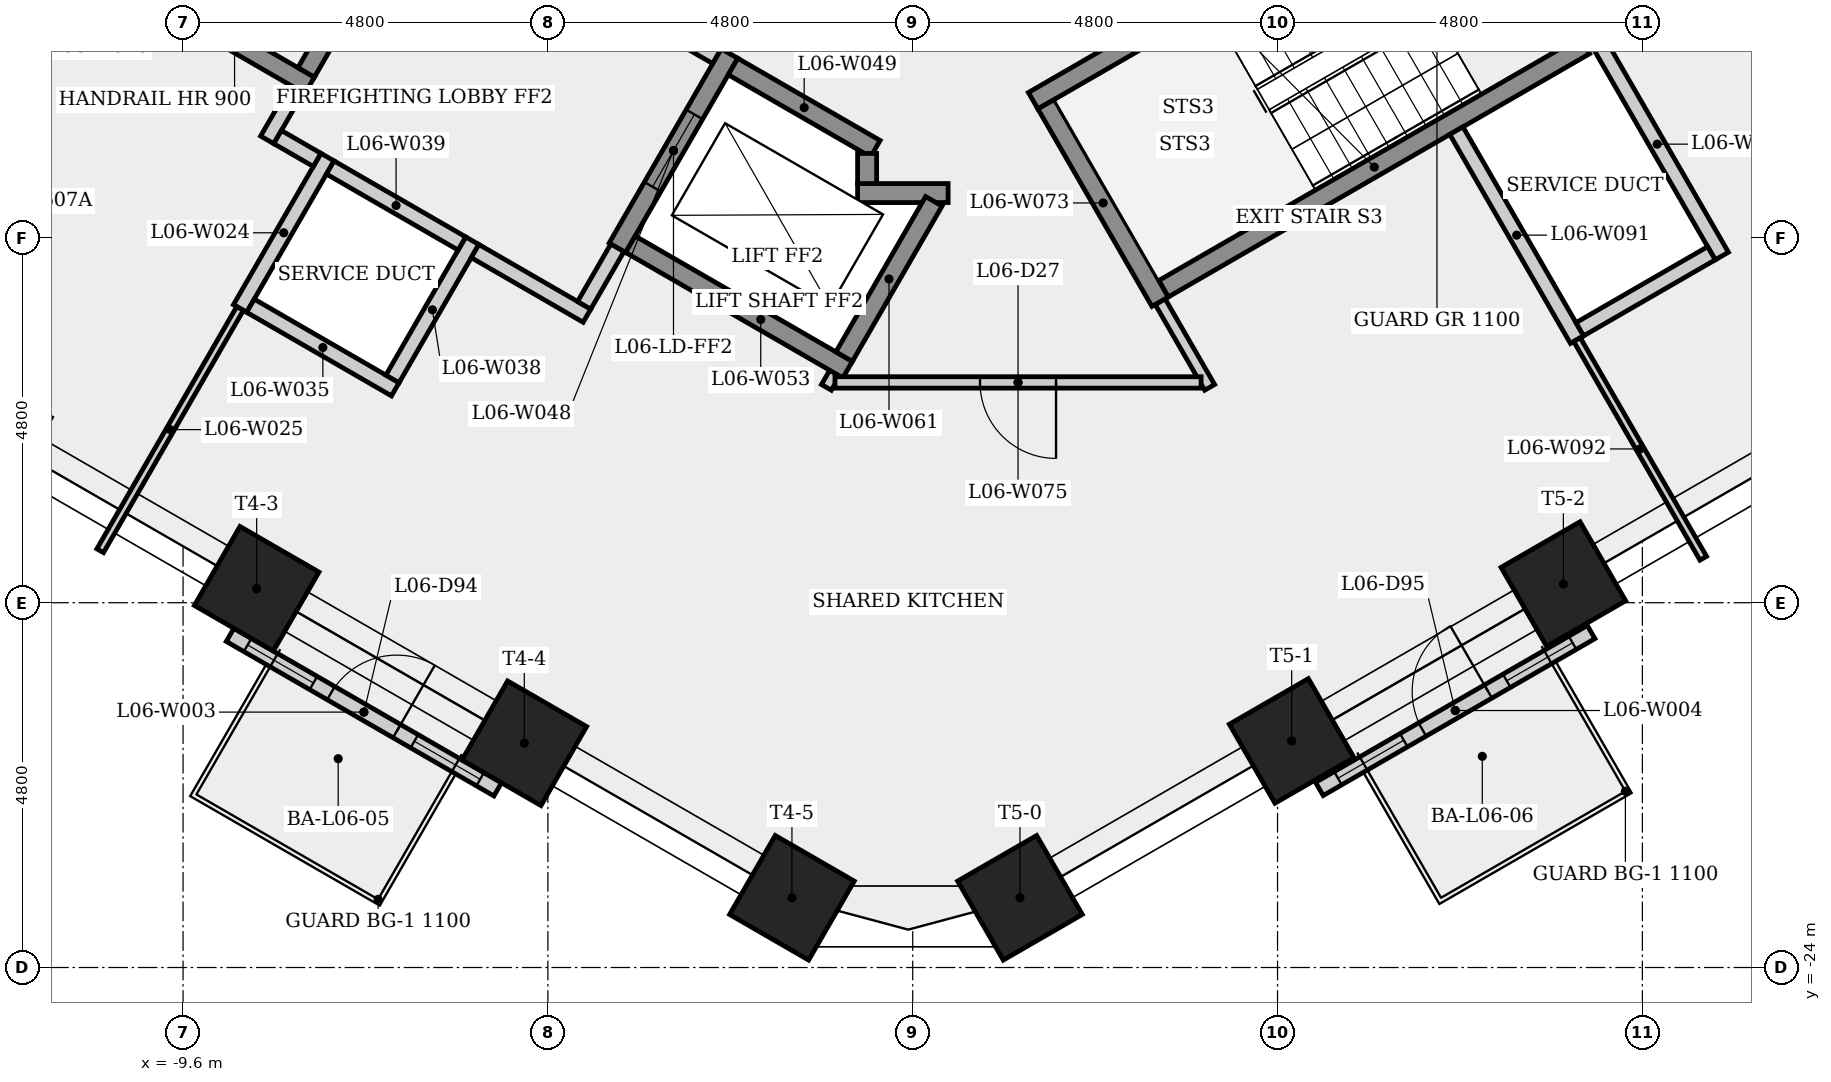
"""IFC4 building model, lengths in metres.
Left out: names, types, materials, properties, quantities, classifications, styles, units other than length and angle.
Written with IfcOpenShell. Run it as: python <this file> out.ifc"""

import sys

from ifc_helpers import new_model, si_unit, direction, frame, frame_2d, origin, origin_2d, place, context, subcontext, project, spatial, rectangle, extrude, element, fill, save


model = new_model("IFC4")
c1 = context("Model", 3, precision=1e-05, world=origin(), true_north=direction((0.0, 1.0)))
c2 = subcontext(c1, "Body", "Model", "MODEL_VIEW")
j1 = project(units=[si_unit("LENGTHUNIT", "METRE"), si_unit("PLANEANGLEUNIT", "RADIAN")], contexts=[c1])
p1 = place(None, origin())
s1 = spatial("IfcSite", under=j1, at=p1, CompositionType="ELEMENT")
p2 = place(p1, origin())
s2 = spatial("IfcBuilding", under=s1, at=p2, CompositionType="ELEMENT")
p3 = place(p2, frame((0.0, 0.0, 28.9)))
s3 = spatial("IfcBuildingStorey", under=s2, at=p3, CompositionType="ELEMENT", Elevation=28.9)
for number, where, z_axis, x_axis in (
    (1, (-8.632, -19.017, 0.0), (0.0, 0.0, 1.0), (-0.5, -0.866, 0.0)),
    (2, (-5.11, -21.05, 0.0), (0.0, 0.0, 1.0), (-0.5, -0.866, 0.0)),
    (3, (-1.589, -23.083, 0.0), (0.0, 0.0, 1.0), (-0.5, -0.866, 0.0)),
    (4, (1.411, -23.083, 0.0), (0.0, 0.0, 1.0), (0.5, -0.866, 0.0)),
    (5, (4.986, -21.019, 0.0), (0.0, 0.0, 1.0), (0.5, -0.866, 0.0)),
    (6, (8.561, -18.955, 0.0), (0.0, 0.0, 1.0), (0.5, -0.866, 0.0)),
):
    element("IfcColumn", number, at=place(p3, frame(where, z_axis=z_axis, x_axis=x_axis)), inside=s3, PredefinedType="COLUMN", context=c2, shape_type="SweptSolid", body=[
        extrude(rectangle(XDim=1.2, YDim=1.2, at=origin_2d()), origin(), (0.0, 0.0, 1.0), 3.4),
    ])
p4 = place(p3, frame((-8.981, -19.623, 0.0), z_axis=(0.0, 0.0, 1.0), x_axis=(0.866028600041, -0.49999446388, 0.0)))
e7 = element("IfcWall", 7, at=p4, inside=s3, PredefinedType="SOLIDWALL", context=c2, shape_type="SweptSolid", body=[
    extrude(rectangle(XDim=4.066, YDim=0.2, at=frame_2d((2.033, 0.0))), origin(), (0.0, 0.0, 1.0), 3.4),
])
p5 = place(p4, frame((1.533, 0.0, 0.0)))
e8 = element("IfcOpeningElement", 8, at=p5, cuts=e7, PredefinedType="OPENING", context=c2, shape_type="SweptSolid", body=[
    extrude(rectangle(XDim=1.0, YDim=2.4, at=frame_2d((0.5, 1.2))), frame((0.0, 0.11, 0.0), z_axis=(0.0, -1.0, 0.0), x_axis=(1.0, 0.0, 0.0)), (0.0, 0.0, 1.0), 0.22),
])
p6 = place(p4, frame((0.267, 0.0, 0.9)))
e9 = element("IfcOpeningElement", 9, at=p6, cuts=e7, PredefinedType="OPENING", context=c2, shape_type="SweptSolid", body=[
    extrude(rectangle(XDim=1.0, YDim=1.5, at=frame_2d((0.5, 0.75))), frame((0.0, 0.11, 0.0), z_axis=(0.0, -1.0, 0.0), x_axis=(1.0, 0.0, 0.0)), (0.0, 0.0, 1.0), 0.22),
])
p7 = place(p4, frame((2.8, 0.0, 0.9)))
e10 = element("IfcOpeningElement", 10, at=p7, cuts=e7, PredefinedType="OPENING", context=c2, shape_type="SweptSolid", body=[
    extrude(rectangle(XDim=1.0, YDim=1.5, at=frame_2d((0.5, 0.75))), frame((0.0, 0.11, 0.0), z_axis=(0.0, -1.0, 0.0), x_axis=(1.0, 0.0, 0.0)), (0.0, 0.0, 1.0), 0.22),
])
p8 = place(p3, frame((5.351, -21.65, 0.0), z_axis=(0.0, 0.0, 1.0), x_axis=(0.866028988896, 0.499993790352, 0.0)))
e11 = element("IfcWall", 11, at=p8, inside=s3, PredefinedType="SOLIDWALL", context=c2, shape_type="SweptSolid", body=[
    extrude(rectangle(XDim=4.128, YDim=0.2, at=frame_2d((2.064, 0.0))), origin(), (0.0, 0.0, 1.0), 3.4),
])
p9 = place(p8, frame((1.564, 0.0, 0.0)))
e12 = element("IfcOpeningElement", 12, at=p9, cuts=e11, PredefinedType="OPENING", context=c2, shape_type="SweptSolid", body=[
    extrude(rectangle(XDim=1.0, YDim=2.4, at=frame_2d((0.5, 1.2))), frame((0.0, 0.11, 0.0), z_axis=(0.0, -1.0, 0.0), x_axis=(1.0, 0.0, 0.0)), (0.0, 0.0, 1.0), 0.22),
])
p10 = place(p8, frame((0.282, 0.0, 0.9)))
e13 = element("IfcOpeningElement", 13, at=p10, cuts=e11, PredefinedType="OPENING", context=c2, shape_type="SweptSolid", body=[
    extrude(rectangle(XDim=1.0, YDim=1.5, at=frame_2d((0.5, 0.75))), frame((0.0, 0.11, 0.0), z_axis=(0.0, -1.0, 0.0), x_axis=(1.0, 0.0, 0.0)), (0.0, 0.0, 1.0), 0.22),
])
p11 = place(p8, frame((2.846, 0.0, 0.9)))
e14 = element("IfcOpeningElement", 14, at=p11, cuts=e11, PredefinedType="OPENING", context=c2, shape_type="SweptSolid", body=[
    extrude(rectangle(XDim=1.0, YDim=1.5, at=frame_2d((0.5, 0.75))), frame((0.0, 0.11, 0.0), z_axis=(0.0, -1.0, 0.0), x_axis=(1.0, 0.0, 0.0)), (0.0, 0.0, 1.0), 0.22),
])
p12 = place(p3, frame((-8.85, -15.329, 0.0), z_axis=(0.0, 0.0, 1.0), x_axis=(0.500077740698, 0.865980515519, 0.0)))
e15 = element("IfcWall", 15, at=p12, inside=s3, PredefinedType="PLUMBINGWALL", context=c2, shape_type="SweptSolid", body=[
    extrude(rectangle(XDim=2.3, YDim=0.2, at=frame_2d((1.15, 0.0))), origin(), (0.0, 0.0, 1.0), 3.05),
])
p13 = place(p3, frame((-8.85, -15.329, 0.0), z_axis=(0.0, 0.0, 1.0), x_axis=(-0.499955964762, -0.866050826049, 0.0)))
e16 = element("IfcWall", 16, at=p13, inside=s3, PredefinedType="PARTITIONING", context=c2, shape_type="SweptSolid", body=[
    extrude(rectangle(XDim=3.68, YDim=0.1, at=frame_2d((1.84, 0.0))), origin(), (0.0, 0.0, 1.0), 3.05),
])
p14 = place(p3, frame((-8.493, -13.11, 0.0), z_axis=(0.0, 0.0, 1.0), x_axis=(0.500067724834, 0.865986299303, 0.0)))
e17 = element("IfcWall", 17, at=p14, inside=s3, PredefinedType="PARTITIONING", context=c2, shape_type="SweptSolid", body=[
    extrude(rectangle(XDim=0.775, YDim=0.2, at=frame_2d((0.388, 0.0))), origin(), (0.0, 0.0, 1.0), 3.05),
])
p15 = place(p3, frame((-7.935, -12.393, 0.0), z_axis=(0.0, 0.0, 1.0), x_axis=(-0.866025499775, 0.499999833739, 0.0)))
e18 = element("IfcWall", 18, at=p15, inside=s3, PredefinedType="SHEAR", context=c2, shape_type="SweptSolid", body=[
    extrude(rectangle(XDim=6.4, YDim=0.25, at=frame_2d((3.2, 0.0))), origin(), (0.0, 0.0, 1.0), 3.05),
])
p16 = place(p3, frame((-7.836, -13.373, 0.0), z_axis=(0.0, 0.0, 1.0), x_axis=(-0.866232998003, 0.499640263761, 0.0)))
e19 = element("IfcWall", 19, at=p16, inside=s3, PredefinedType="PARTITIONING", context=c2, shape_type="SweptSolid", body=[
    extrude(rectangle(XDim=0.6, YDim=0.2, at=frame_2d((0.3, 0.0))), origin(), (0.0, 0.0, 1.0), 3.05),
])
p17 = place(p3, frame((-6.808, -16.392, 0.0), z_axis=(0.0, 0.0, 1.0), x_axis=(-0.866008176907, 0.50002983664, 0.0)))
e20 = element("IfcWall", 20, at=p17, inside=s3, PredefinedType="PLUMBINGWALL", context=c2, shape_type="SweptSolid", body=[
    extrude(rectangle(XDim=2.2, YDim=0.2, at=frame_2d((1.1, 0.0))), origin(), (0.0, 0.0, 1.0), 3.05),
])
p18 = place(p3, frame((-6.605, -9.841, 0.0), z_axis=(0.0, 0.0, 1.0), x_axis=(-0.499996545922, -0.866027397988, 0.0)))
e21 = element("IfcWall", 21, at=p18, inside=s3, PredefinedType="SHEAR", context=c2, shape_type="SweptSolid", body=[
    extrude(rectangle(XDim=2.75, YDim=0.25, at=frame_2d((1.375, 0.0))), origin(), (0.0, 0.0, 1.0), 3.05),
])
p19 = place(p18, frame((0.875, 0.0, 0.0)))
e22 = element("IfcOpeningElement", 22, at=p19, cuts=e21, PredefinedType="OPENING", context=c2, shape_type="SweptSolid", body=[
    extrude(rectangle(XDim=1.0, YDim=2.1, at=frame_2d((0.5, 1.05))), frame((0.0, 0.135, 0.0), z_axis=(0.0, -1.0, 0.0), x_axis=(1.0, 0.0, 0.0)), (0.0, 0.0, 1.0), 0.27),
])
p20 = place(p3, frame((-6.435, -9.795, 0.0), z_axis=(0.0, 0.0, 1.0), x_axis=(0.866012907634, -0.500021643343, 0.0)))
e23 = element("IfcWall", 23, at=p20, inside=s3, PredefinedType="PARTITIONING", context=c2, shape_type="SweptSolid", body=[
    extrude(rectangle(XDim=4.45, YDim=0.2, at=frame_2d((2.225, 0.0))), origin(), (0.0, 0.0, 1.0), 3.05),
])
p21 = place(p20, frame((1.675, 0.0, 0.0)))
e24 = element("IfcOpeningElement", 24, at=p21, cuts=e23, PredefinedType="OPENING", context=c2, shape_type="SweptSolid", body=[
    extrude(rectangle(XDim=1.1, YDim=2.1, at=frame_2d((0.55, 1.05))), frame((0.0, 0.11, 0.0), z_axis=(0.0, -1.0, 0.0), x_axis=(1.0, 0.0, 0.0)), (0.0, 0.0, 1.0), 0.22),
])
p22 = place(p3, frame((-5.795, -14.437, 0.0), z_axis=(0.0, 0.0, 1.0), x_axis=(-0.500027713859, -0.866009402589, 0.0)))
e25 = element("IfcWall", 25, at=p22, inside=s3, PredefinedType="PLUMBINGWALL", context=c2, shape_type="SweptSolid", body=[
    extrude(rectangle(XDim=2.1, YDim=0.2, at=frame_2d((1.05, 0.0))), origin(), (0.0, 0.0, 1.0), 3.05),
])
p23 = place(p3, frame((-5.931, -14.473, 0.0), z_axis=(0.0, 0.0, 1.0), x_axis=(-0.866041268327, 0.499972520799, 0.0)))
e26 = element("IfcWall", 26, at=p23, inside=s3, PredefinedType="PLUMBINGWALL", context=c2, shape_type="SweptSolid", body=[
    extrude(rectangle(XDim=2.0, YDim=0.2, at=frame_2d((1.0, 0.0))), origin(), (0.0, 0.0, 1.0), 3.05),
])
p24 = place(p3, frame((-4.286, -15.423, 0.0), z_axis=(0.0, 0.0, 1.0), x_axis=(-0.866025371046, 0.500000056704, 0.0)))
e27 = element("IfcWall", 27, at=p24, inside=s3, PredefinedType="PARTITIONING", context=c2, shape_type="SweptSolid", body=[
    extrude(rectangle(XDim=1.7, YDim=0.2, at=frame_2d((0.85, 0.0))), origin(), (0.0, 0.0, 1.0), 3.05),
])
p25 = place(p3, frame((-3.885, -14.529, 0.0), z_axis=(0.0, 0.0, 1.0), x_axis=(-0.499859285417, -0.866106630146, 0.0)))
e28 = element("IfcWall", 28, at=p25, inside=s3, PredefinedType="PARTITIONING", context=c2, shape_type="SweptSolid", body=[
    extrude(rectangle(XDim=0.875, YDim=0.2, at=frame_2d((0.438, 0.0))), origin(), (0.0, 0.0, 1.0), 3.05),
])
p26 = place(p3, frame((-2.41, -11.974, 0.0), z_axis=(0.0, 0.0, 1.0), x_axis=(-0.500001826776, -0.866024349092, 0.0)))
e29 = element("IfcWall", 29, at=p26, inside=s3, PredefinedType="SHEAR", context=c2, shape_type="SweptSolid", body=[
    extrude(rectangle(XDim=2.95, YDim=0.25, at=frame_2d((1.475, 0.0))), origin(), (0.0, 0.0, 1.0), 3.05),
])
p27 = place(p26, frame((0.925, 0.0, 0.0)))
e30 = element("IfcOpeningElement", 30, at=p27, cuts=e29, PredefinedType="OPENING", context=c2, shape_type="SweptSolid", body=[
    extrude(rectangle(XDim=1.1, YDim=2.1, at=frame_2d((0.55, 1.05))), frame((0.0, 0.135, 0.0), z_axis=(0.0, -1.0, 0.0), x_axis=(1.0, 0.0, 0.0)), (0.0, 0.0, 1.0), 0.27),
])
p28 = place(p3, frame((-2.364, -12.145, 0.0), z_axis=(0.0, 0.0, 1.0), x_axis=(0.86603892542, -0.499976579108, 0.0)))
e31 = element("IfcWall", 31, at=p28, inside=s3, PredefinedType="SHEAR", context=c2, shape_type="SweptSolid", body=[
    extrude(rectangle(XDim=2.162, YDim=0.25, at=frame_2d((1.081, 0.0))), origin(), (0.0, 0.0, 1.0), 3.05),
])
p29 = place(p3, frame((-1.135, -16.367, 0.0), z_axis=(0.0, 0.0, 1.0), x_axis=(0.500014901547, 0.866016800201, 0.0)))
e32 = element("IfcWall", 32, at=p29, inside=s3, PredefinedType="PARTITIONING", context=c2, shape_type="SweptSolid", body=[
    extrude(rectangle(XDim=0.217, YDim=0.15, at=frame_2d((0.108, 0.0))), origin(), (0.0, 0.0, 1.0), 3.05),
])
p30 = place(p3, frame((-0.856, -16.133, 0.0), z_axis=(0.0, 0.0, 1.0), x_axis=(-0.866021716278, 0.500006386895, 0.0)))
e33 = element("IfcWall", 33, at=p30, inside=s3, PredefinedType="SHEAR", context=c2, shape_type="SweptSolid", body=[
    extrude(rectangle(XDim=3.3, YDim=0.25, at=frame_2d((1.65, 0.0))), origin(), (0.0, 0.0, 1.0), 3.05),
])
p31 = place(p3, frame((-0.725, -13.81, 0.0), z_axis=(0.0, 0.0, 1.0), x_axis=(1.0, 0.0, 0.0)))
e34 = element("IfcWall", 34, at=p31, inside=s3, PredefinedType="SHEAR", context=c2, shape_type="SweptSolid", body=[
    extrude(rectangle(XDim=1.191, YDim=0.25, at=frame_2d((0.595, 0.0))), origin(), (0.0, 0.0, 1.0), 3.05),
])
p32 = place(p3, frame((-0.6, -13.289, 0.0), z_axis=(0.0, 0.0, 1.0), x_axis=(0.0, -1.0, 0.0)))
e35 = element("IfcWall", 35, at=p32, inside=s3, PredefinedType="SHEAR", context=c2, shape_type="SweptSolid", body=[
    extrude(rectangle(XDim=0.396, YDim=0.25, at=frame_2d((0.198, 0.0))), origin(), (0.0, 0.0, 1.0), 3.4),
])
p33 = place(p3, frame((0.278, -13.918, 0.0), z_axis=(0.0, 0.0, 1.0), x_axis=(-0.49998806882, -0.866032292145, 0.0)))
e36 = element("IfcWall", 36, at=p33, inside=s3, PredefinedType="SHEAR", context=c2, shape_type="SweptSolid", body=[
    extrude(rectangle(XDim=2.36, YDim=0.25, at=frame_2d((1.18, 0.0))), origin(), (0.0, 0.0, 1.0), 3.4),
])
p34 = place(p3, frame((1.585, -12.595, 0.0), z_axis=(0.0, 0.0, 1.0), x_axis=(0.866036417653, 0.499980922934, 0.0)))
e37 = element("IfcWall", 37, at=p34, inside=s3, PredefinedType="SHEAR", context=c2, shape_type="SweptSolid", body=[
    extrude(rectangle(XDim=6.65, YDim=0.25, at=frame_2d((3.325, 0.0))), origin(), (0.0, 0.0, 1.0), 3.05),
])
p35 = place(p34, frame((5.275, 0.0, 0.0)))
e38 = element("IfcOpeningElement", 38, at=p35, cuts=e37, PredefinedType="OPENING", context=c2, shape_type="SweptSolid", body=[
    extrude(rectangle(XDim=1.0, YDim=2.1, at=frame_2d((0.5, 1.05))), frame((0.0, 0.135, 0.0), z_axis=(0.0, -1.0, 0.0), x_axis=(1.0, 0.0, 0.0)), (0.0, 0.0, 1.0), 0.27),
])
p36 = place(p3, frame((3.256, -15.239, 0.0), z_axis=(0.0, 0.0, 1.0), x_axis=(0.499949632511, -0.866054481515, 0.0)))
e39 = element("IfcWall", 39, at=p36, inside=s3, PredefinedType="PARTITIONING", context=c2, shape_type="SweptSolid", body=[
    extrude(rectangle(XDim=1.302, YDim=0.15, at=frame_2d((0.651, 0.0))), origin(), (0.0, 0.0, 1.0), 3.05),
])
p37 = place(p3, frame((3.256, -15.239, 0.0), z_axis=(0.0, 0.0, 1.0), x_axis=(-0.50002537861, 0.866010750942, 0.0)))
e40 = element("IfcWall", 40, at=p37, inside=s3, PredefinedType="SHEAR", context=c2, shape_type="SweptSolid", body=[
    extrude(rectangle(XDim=3.0, YDim=0.25, at=frame_2d((1.5, 0.0))), origin(), (0.0, 0.0, 1.0), 3.05),
])
p38 = place(p3, frame((3.794, -16.302, 0.0), z_axis=(0.0, 0.0, 1.0), x_axis=(-1.0, 0.0, 0.0)))
e41 = element("IfcWall", 41, at=p38, inside=s3, PredefinedType="PARTITIONING", context=c2, shape_type="SweptSolid", body=[
    extrude(rectangle(XDim=4.817, YDim=0.15, at=frame_2d((2.409, 0.0))), origin(), (0.0, 0.0, 1.0), 3.05),
])
p39 = place(p38, frame((1.908, 0.0, 0.0)))
e42 = element("IfcOpeningElement", 42, at=p39, cuts=e41, PredefinedType="OPENING", context=c2, shape_type="SweptSolid", body=[
    extrude(rectangle(XDim=1.0, YDim=2.1, at=frame_2d((0.5, 1.05))), frame((0.0, 0.085, 0.0), z_axis=(0.0, -1.0, 0.0), x_axis=(1.0, 0.0, 0.0)), (0.0, 0.0, 1.0), 0.17),
])
p40 = place(p3, frame((3.301, -15.068, 0.0), z_axis=(0.0, 0.0, 1.0), x_axis=(0.866035036182, 0.499983315828, 0.0)))
e43 = element("IfcWall", 43, at=p40, inside=s3, PredefinedType="SHEAR", context=c2, shape_type="SweptSolid", body=[
    extrude(rectangle(XDim=6.4, YDim=0.25, at=frame_2d((3.2, 0.0))), origin(), (0.0, 0.0, 1.0), 3.05),
])
p41 = place(p3, frame((7.153, -12.989, 0.0), z_axis=(0.0, 0.0, 1.0), x_axis=(0.500017526161, -0.866015284814, 0.0)))
e44 = element("IfcWall", 44, at=p41, inside=s3, PredefinedType="PLUMBINGWALL", context=c2, shape_type="SweptSolid", body=[
    extrude(rectangle(XDim=3.175, YDim=0.2, at=frame_2d((1.588, 0.0))), origin(), (0.0, 0.0, 1.0), 3.05),
])
p42 = place(p3, frame((8.74, -15.738, 0.0), z_axis=(0.0, 0.0, 1.0), x_axis=(0.500036335164, -0.866004424651, 0.0)))
e45 = element("IfcWall", 45, at=p42, inside=s3, PredefinedType="PARTITIONING", context=c2, shape_type="SweptSolid", body=[
    extrude(rectangle(XDim=3.322, YDim=0.1, at=frame_2d((1.661, 0.0))), origin(), (0.0, 0.0, 1.0), 3.05),
])
p43 = place(p3, frame((8.945, -11.694, 0.0), z_axis=(0.0, 0.0, 1.0), x_axis=(0.500062241894, -0.865989465428, 0.0)))
e46 = element("IfcWall", 46, at=p43, inside=s3, PredefinedType="PLUMBINGWALL", context=c2, shape_type="SweptSolid", body=[
    extrude(rectangle(XDim=3.4, YDim=0.2, at=frame_2d((1.7, 0.0))), origin(), (0.0, 0.0, 1.0), 3.05),
])
p44 = place(p3, frame((10.509, -14.602, 0.0), z_axis=(0.0, 0.0, 1.0), x_axis=(-0.866010750942, -0.50002537861, 0.0)))
e47 = element("IfcWall", 47, at=p44, inside=s3, PredefinedType="PLUMBINGWALL", context=c2, shape_type="SweptSolid", body=[
    extrude(rectangle(XDim=2.0, YDim=0.2, at=frame_2d((1.0, 0.0))), origin(), (0.0, 0.0, 1.0), 3.05),
])
p45 = place(p3, frame((12.567, -13.367, 0.0), z_axis=(0.0, 0.0, 1.0), x_axis=(-0.49994119861, 0.866059350121, 0.0)))
e48 = element("IfcWall", 48, at=p45, inside=s3, PredefinedType="PARTITIONING", context=c2, shape_type="SweptSolid", body=[
    extrude(rectangle(XDim=3.059, YDim=0.15, at=frame_2d((1.53, 0.0))), origin(), (0.0, 0.0, 1.0), 3.05),
])
p46 = place(p5, origin())
e49 = element("IfcDoor", 49, at=p46, inside=s3, OperationType="SINGLE_SWING_RIGHT", PredefinedType="DOOR", context=c2, shape_type="SweptSolid", body=[
    extrude(rectangle(XDim=1.0, YDim=2.4, at=frame_2d((0.5, 1.2))), frame((0.0, 0.025, 0.0), z_axis=(0.0, -1.0, 0.0), x_axis=(1.0, 0.0, 0.0)), (0.0, 0.0, 1.0), 0.05),
])
fill(e8, e49)
p47 = place(p6, origin())
e50 = element("IfcWindow", 50, at=p47, inside=s3, PartitioningType="SINGLE_PANEL", PredefinedType="WINDOW", context=c2, shape_type="SweptSolid", body=[
    extrude(rectangle(XDim=1.0, YDim=1.5, at=frame_2d((0.5, 0.75))), frame((0.0, 0.03, 0.0), z_axis=(0.0, -1.0, 0.0), x_axis=(1.0, 0.0, 0.0)), (0.0, 0.0, 1.0), 0.06),
])
fill(e9, e50)
p48 = place(p7, origin())
e51 = element("IfcWindow", 51, at=p48, inside=s3, PartitioningType="SINGLE_PANEL", PredefinedType="WINDOW", context=c2, shape_type="SweptSolid", body=[
    extrude(rectangle(XDim=1.0, YDim=1.5, at=frame_2d((0.5, 0.75))), frame((0.0, 0.03, 0.0), z_axis=(0.0, -1.0, 0.0), x_axis=(1.0, 0.0, 0.0)), (0.0, 0.0, 1.0), 0.06),
])
fill(e10, e51)
p49 = place(p9, origin())
e52 = element("IfcDoor", 52, at=p49, inside=s3, OperationType="SINGLE_SWING_RIGHT", PredefinedType="DOOR", context=c2, shape_type="SweptSolid", body=[
    extrude(rectangle(XDim=1.0, YDim=2.4, at=frame_2d((0.5, 1.2))), frame((0.0, 0.025, 0.0), z_axis=(0.0, -1.0, 0.0), x_axis=(1.0, 0.0, 0.0)), (0.0, 0.0, 1.0), 0.05),
])
fill(e12, e52)
p50 = place(p10, origin())
e53 = element("IfcWindow", 53, at=p50, inside=s3, PartitioningType="SINGLE_PANEL", PredefinedType="WINDOW", context=c2, shape_type="SweptSolid", body=[
    extrude(rectangle(XDim=1.0, YDim=1.5, at=frame_2d((0.5, 0.75))), frame((0.0, 0.03, 0.0), z_axis=(0.0, -1.0, 0.0), x_axis=(1.0, 0.0, 0.0)), (0.0, 0.0, 1.0), 0.06),
])
fill(e13, e53)
p51 = place(p11, origin())
e54 = element("IfcWindow", 54, at=p51, inside=s3, PartitioningType="SINGLE_PANEL", PredefinedType="WINDOW", context=c2, shape_type="SweptSolid", body=[
    extrude(rectangle(XDim=1.0, YDim=1.5, at=frame_2d((0.5, 0.75))), frame((0.0, 0.03, 0.0), z_axis=(0.0, -1.0, 0.0), x_axis=(1.0, 0.0, 0.0)), (0.0, 0.0, 1.0), 0.06),
])
fill(e14, e54)
p52 = place(p27, origin())
e55 = element("IfcDoor", 55, at=p52, inside=s3, OperationType="SLIDING_TO_LEFT", PredefinedType="DOOR", context=c2, shape_type="SweptSolid", body=[
    extrude(rectangle(XDim=1.1, YDim=2.1, at=frame_2d((0.55, 1.05))), frame((0.0, 0.025, 0.0), z_axis=(0.0, -1.0, 0.0), x_axis=(1.0, 0.0, 0.0)), (0.0, 0.0, 1.0), 0.05),
])
fill(e30, e55)
p53 = place(p39, origin())
e56 = element("IfcDoor", 56, at=p53, inside=s3, OperationType="SINGLE_SWING_LEFT", PredefinedType="DOOR", context=c2, shape_type="SweptSolid", body=[
    extrude(rectangle(XDim=1.0, YDim=2.1, at=frame_2d((0.5, 1.05))), frame((0.0, 0.025, 0.0), z_axis=(0.0, -1.0, 0.0), x_axis=(1.0, 0.0, 0.0)), (0.0, 0.0, 1.0), 0.05),
])
fill(e42, e56)
save(model, sys.argv[1])
